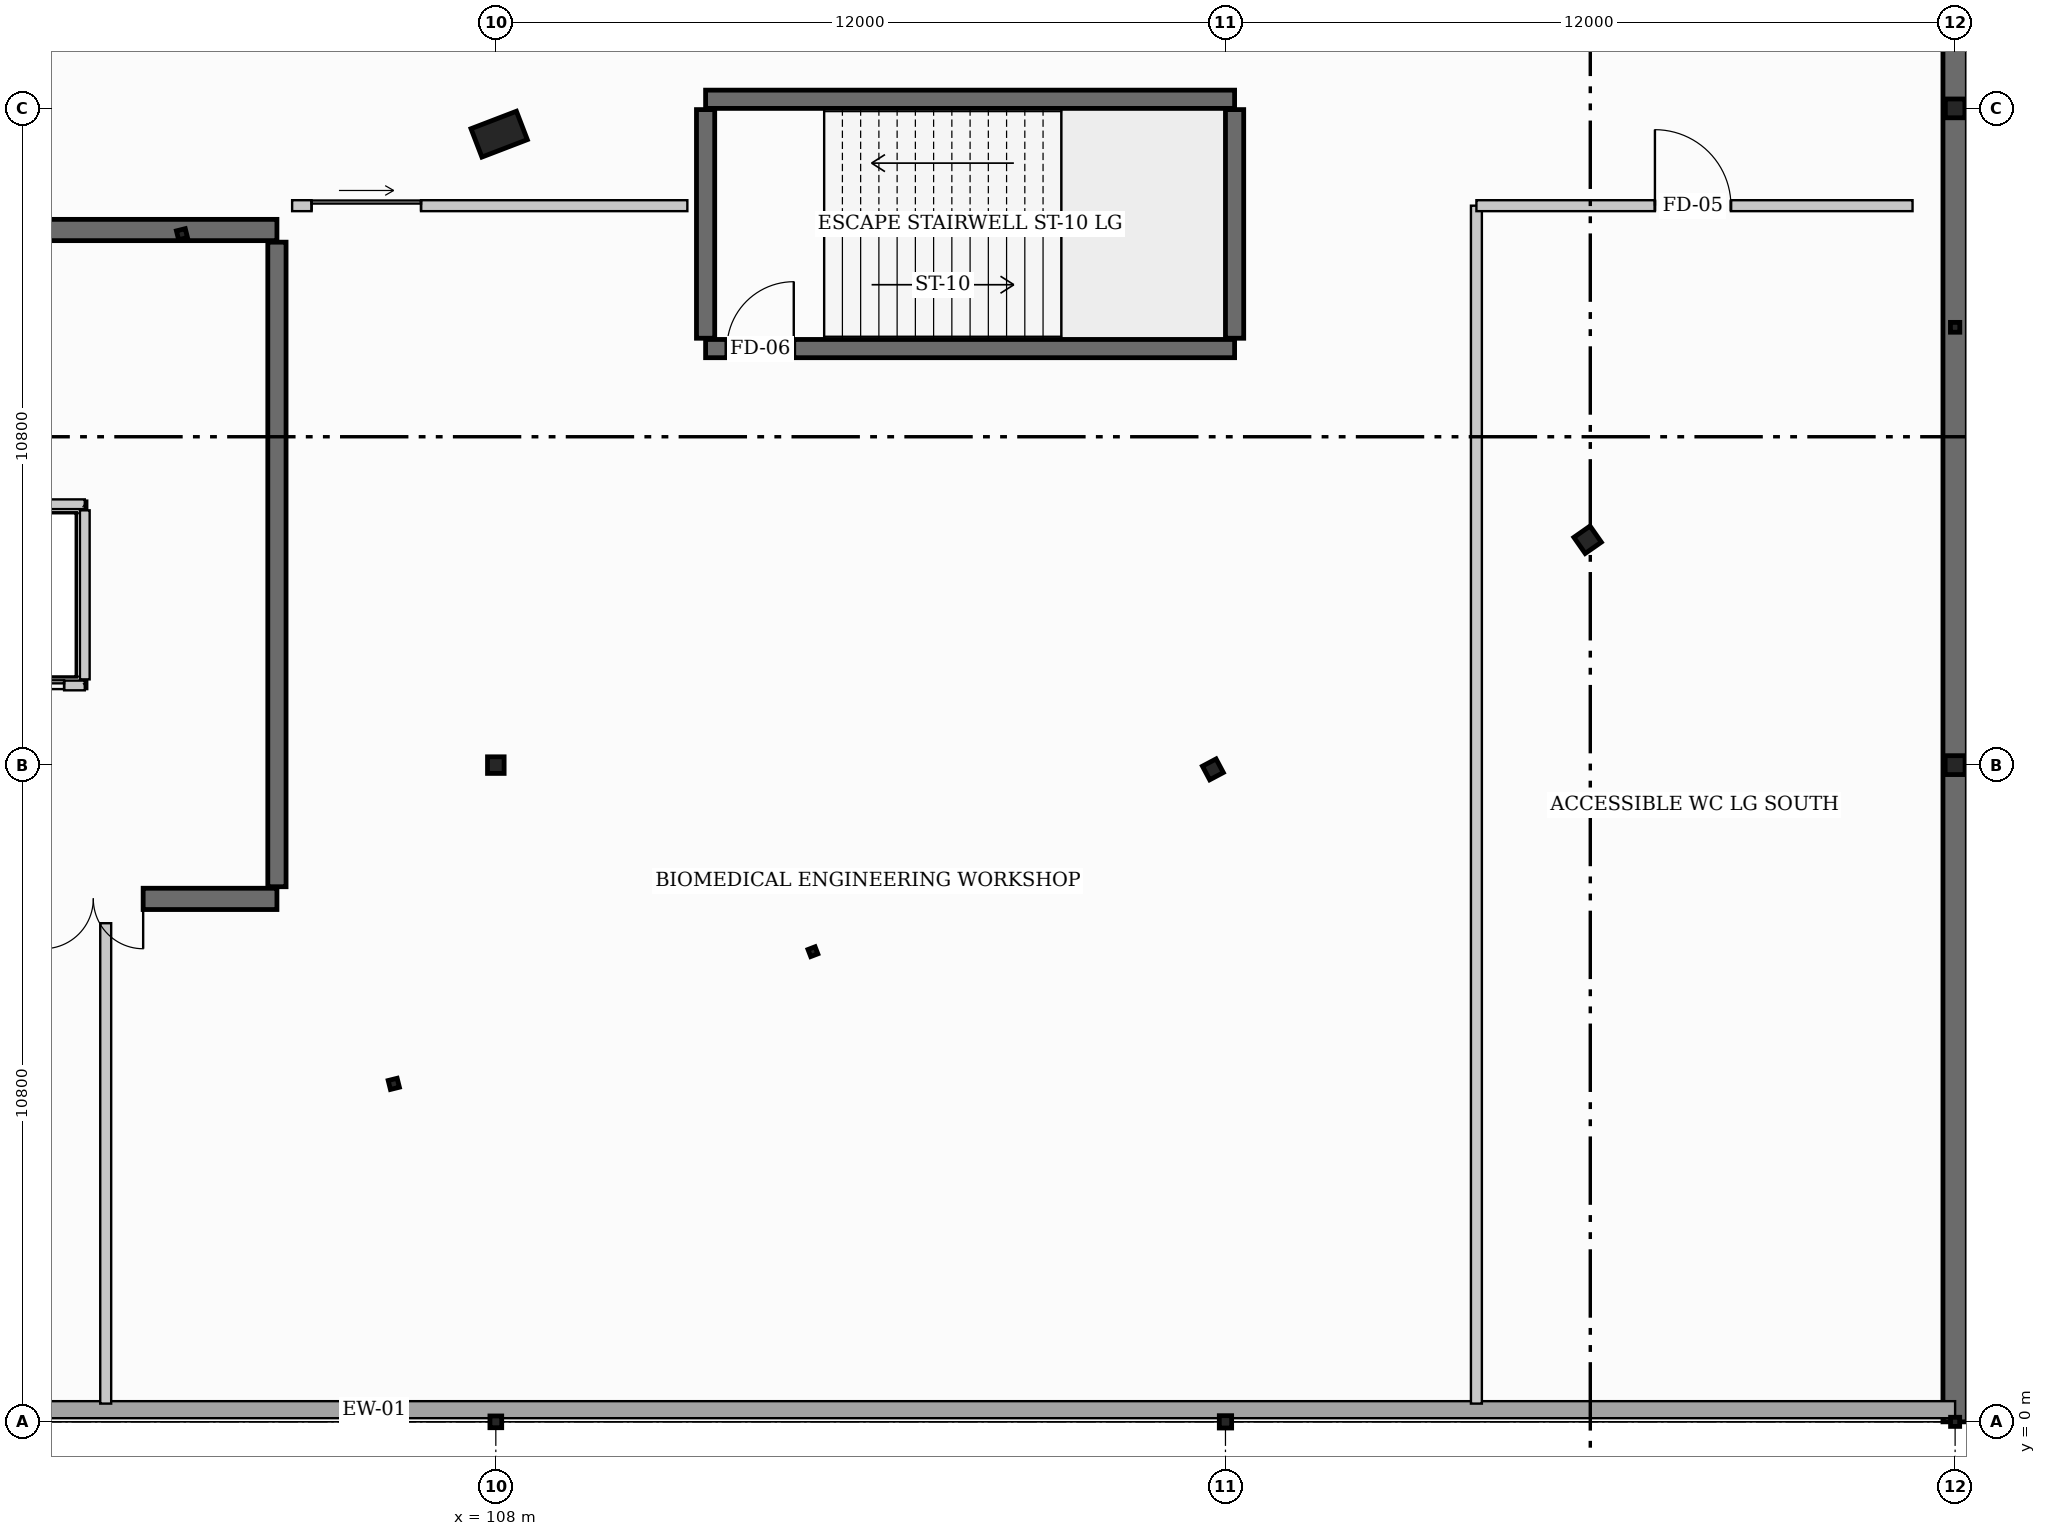
"""IFC4 building model, lengths in metres.
Left out: names, types, materials, properties, quantities, classifications, styles, units other than length and angle.
Written with IfcOpenShell. Run it as: python <this file> out.ifc"""

import sys

from ifc_helpers import new_model, si_unit, direction, frame, frame_2d, origin, origin_2d, place, context, subcontext, project, spatial, rectangle, hollow_rectangle, hollow_circle, i_section, extrude, element, fill, save


model = new_model("IFC4")
c1 = context("Model", 3, precision=1e-05, world=origin(), true_north=direction((0.0, 1.0)))
c2 = subcontext(c1, "Body", "Model", "MODEL_VIEW")
j1 = project(units=[si_unit("LENGTHUNIT", "METRE"), si_unit("PLANEANGLEUNIT", "RADIAN")], contexts=[c1])
p1 = place(None, origin())
s1 = spatial("IfcSite", under=j1, at=p1, CompositionType="ELEMENT")
p2 = place(p1, origin())
s2 = spatial("IfcBuilding", under=s1, at=p2, CompositionType="ELEMENT")
p3 = place(p2, frame((0.0, 0.0, -4.8)))
s3 = spatial("IfcBuildingStorey", under=s2, at=p3, CompositionType="ELEMENT", Elevation=-4.8)
p4 = place(p3, frame((132.0, 0.0, 0.0), z_axis=(0.0, 0.0, 1.0), x_axis=(0.0, 1.0, 0.0)))
e1 = element("IfcWall", 1, at=p4, inside=s3, PredefinedType="USERDEFINED", context=c2, shape_type="SweptSolid", body=[
    extrude(rectangle(XDim=45.6, YDim=0.4, at=frame_2d((22.8, 0.0))), origin(), (0.0, 0.0, 1.0), 4.8),
])
p5 = place(p3, frame((108.0, 0.0, 0.0), z_axis=(0.0, 0.0, 1.0), x_axis=(0.0, 1.0, 0.0)))
e2 = element("IfcColumn", 2, at=p5, inside=s3, PredefinedType="COLUMN", context=c2, shape_type="SweptSolid", body=[
    extrude(hollow_circle(Radius=0.097, WallThickness=0.008, at=origin_2d()), origin(), (0.0, 0.0, 1.0), 4.8),
])
p6 = place(p3, frame((108.0, 10.8, 0.0), z_axis=(0.0, 0.0, 1.0), x_axis=(0.0, 1.0, 0.0)))
e3 = element("IfcColumn", 3, at=p6, inside=s3, PredefinedType="COLUMN", context=c2, shape_type="SweptSolid", body=[
    extrude(hollow_circle(Radius=0.136, WallThickness=0.013, at=origin_2d()), origin(), (0.0, 0.0, 1.0), 4.8),
])
p7 = place(p3, frame((120.0, 0.0, 0.0), z_axis=(0.0, 0.0, 1.0), x_axis=(1.0, 0.0, 0.0)))
e4 = element("IfcColumn", 4, at=p7, inside=s3, PredefinedType="COLUMN", context=c2, shape_type="SweptSolid", body=[
    extrude(i_section(OverallWidth=0.203, OverallDepth=0.203, WebThickness=0.007, FlangeThickness=0.011, at=origin_2d()), origin(), (0.0, 0.0, 1.0), 4.8),
])
p8 = place(p3, frame((132.0, 0.0, 0.0), z_axis=(0.0, 0.0, 1.0), x_axis=(0.0, 1.0, 0.0)))
e5 = element("IfcColumn", 5, at=p8, inside=s3, PredefinedType="COLUMN", context=c2, shape_type="SweptSolid", body=[
    extrude(hollow_rectangle(XDim=0.15, YDim=0.15, WallThickness=0.008, at=origin_2d()), origin(), (0.0, 0.0, 1.0), 4.8),
])
p9 = place(p3, frame((132.0, 10.8, 0.0), z_axis=(0.0, 0.0, 1.0), x_axis=(0.0, 1.0, 0.0)))
e6 = element("IfcColumn", 6, at=p9, inside=s3, PredefinedType="COLUMN", context=c2, shape_type="SweptSolid", body=[
    extrude(i_section(OverallWidth=0.311, OverallDepth=0.327, WebThickness=0.016, FlangeThickness=0.025, at=origin_2d()), origin(), (0.0, 0.0, 1.0), 4.8),
])
p10 = place(p3, frame((132.0, 21.6, 0.0), z_axis=(0.0, 0.0, 1.0), x_axis=(0.0, 1.0, 0.0)))
e7 = element("IfcColumn", 7, at=p10, inside=s3, PredefinedType="COLUMN", context=c2, shape_type="SweptSolid", body=[
    extrude(i_section(OverallWidth=0.309, OverallDepth=0.321, WebThickness=0.014, FlangeThickness=0.022, at=origin_2d()), origin(), (0.0, 0.0, 1.0), 4.8),
])
p11 = place(p3, frame((106.322, 5.558, 0.0), z_axis=(0.0, 0.0, 1.0), x_axis=(-0.2419218956, 0.970295726276, 0.0)))
e8 = element("IfcColumn", 8, at=p11, inside=s3, PredefinedType="COLUMN", context=c2, shape_type="SweptSolid", body=[
    extrude(i_section(OverallWidth=0.152, OverallDepth=0.152, WebThickness=0.006, FlangeThickness=0.007, at=origin_2d()), origin(), (0.0, 0.0, 1.0), 4.8),
])
p12 = place(p3, frame((102.838, 19.531, 0.0), z_axis=(0.0, 0.0, 1.0), x_axis=(-0.2419218956, 0.970295726276, 0.0)))
e9 = element("IfcColumn", 9, at=p12, inside=s3, PredefinedType="COLUMN", context=c2, shape_type="SweptSolid", body=[
    extrude(hollow_rectangle(XDim=0.15, YDim=0.15, WallThickness=0.008, at=origin_2d()), origin(), (0.0, 0.0, 1.0), 4.8),
])
p13 = place(p3, frame((113.215, 7.732, 0.0), z_axis=(0.0, 0.0, 1.0), x_axis=(-0.358367949545, 0.933580426497, 0.0)))
e10 = element("IfcColumn", 10, at=p13, inside=s3, PredefinedType="COLUMN", context=c2, shape_type="SweptSolid", body=[
    extrude(hollow_rectangle(XDim=0.125, YDim=0.125, WallThickness=0.006, at=origin_2d()), origin(), (0.0, 0.0, 1.0), 4.8),
])
p14 = place(p3, frame((108.055, 21.176, 0.0), z_axis=(0.0, 0.0, 1.0), x_axis=(-0.358367949545, 0.933580426497, 0.0)))
e11 = element("IfcColumn", 11, at=p14, inside=s3, PredefinedType="PILASTER", context=c2, shape_type="SweptSolid", body=[
    extrude(rectangle(XDim=0.5, YDim=0.8, at=origin_2d()), origin(), (0.0, 0.0, 1.0), 4.8),
])
p15 = place(p3, frame((119.793, 10.73, 0.0), z_axis=(0.0, 0.0, 1.0), x_axis=(-0.469471562786, 0.882947592859, 0.0)))
e12 = element("IfcColumn", 12, at=p15, inside=s3, PredefinedType="COLUMN", context=c2, shape_type="SweptSolid", body=[
    extrude(i_section(OverallWidth=0.254, OverallDepth=0.254, WebThickness=0.009, FlangeThickness=0.014, at=origin_2d()), origin(), (0.0, 0.0, 1.0), 4.8),
])
p16 = place(p3, frame((125.956, 14.506, 0.0), z_axis=(0.0, 0.0, 1.0), x_axis=(-0.573576436351, 0.819152044289, 0.0)))
e13 = element("IfcColumn", 13, at=p16, inside=s3, PredefinedType="COLUMN", context=c2, shape_type="SweptSolid", body=[
    extrude(hollow_circle(Radius=0.162, WallThickness=0.013, at=origin_2d()), origin(), (0.0, 0.0, 1.0), 4.8),
])
p17 = place(p3, frame((132.0, 18.0, 0.0), z_axis=(0.0, 0.0, 1.0), x_axis=(1.0, 0.0, 0.0)))
e14 = element("IfcColumn", 14, at=p17, inside=s3, PredefinedType="COLUMN", context=c2, shape_type="SweptSolid", body=[
    extrude(i_section(OverallWidth=0.154, OverallDepth=0.162, WebThickness=0.008, FlangeThickness=0.011, at=origin_2d()), origin(), (0.0, 0.0, 1.0), 4.8),
])
p18 = place(p3, frame((84.0, 19.6, 0.0), z_axis=(0.0, 0.0, 1.0), x_axis=(1.0, 0.0, 0.0)))
e15 = element("IfcWall", 15, at=p18, inside=s3, PredefinedType="SHEAR", context=c2, shape_type="SweptSolid", body=[
    extrude(rectangle(XDim=20.4, YDim=0.35, at=frame_2d((10.2, 0.0))), origin(), (0.0, 0.0, 1.0), 4.8),
])
p19 = place(p3, frame((104.4, 8.6, 0.0), z_axis=(0.0, 0.0, 1.0), x_axis=(-1.0, 0.0, 0.0)))
e16 = element("IfcWall", 16, at=p19, inside=s3, PredefinedType="SHEAR", context=c2, shape_type="SweptSolid", body=[
    extrude(rectangle(XDim=20.4, YDim=0.35, at=frame_2d((10.2, 0.0))), origin(), (0.0, 0.0, 1.0), 4.8),
])
p20 = place(p19, frame((2.2, 0.0, 0.0)))
e17 = element("IfcOpeningElement", 17, at=p20, cuts=e16, PredefinedType="OPENING", context=c2, shape_type="SweptSolid", body=[
    extrude(rectangle(XDim=1.64, YDim=2.2, at=frame_2d((0.82, 1.1))), frame((0.0, 0.185, 0.0), z_axis=(0.0, -1.0, 0.0), x_axis=(1.0, 0.0, 0.0)), (0.0, 0.0, 1.0), 0.37),
])
p21 = place(p19, frame((13.0, 0.0, 0.0)))
e18 = element("IfcOpeningElement", 18, at=p21, cuts=e16, PredefinedType="OPENING", context=c2, shape_type="SweptSolid", body=[
    extrude(rectangle(XDim=1.52, YDim=2.16, at=frame_2d((0.76, 1.08))), frame((0.0, 0.185, 0.0), z_axis=(0.0, -1.0, 0.0), x_axis=(1.0, 0.0, 0.0)), (0.0, 0.0, 1.0), 0.37),
])
p22 = place(p3, frame((104.4, 19.4, 0.0), z_axis=(0.0, 0.0, 1.0), x_axis=(0.0, -1.0, 0.0)))
e19 = element("IfcWall", 19, at=p22, inside=s3, PredefinedType="SHEAR", context=c2, shape_type="SweptSolid", body=[
    extrude(rectangle(XDim=10.6, YDim=0.3, at=frame_2d((5.3, 0.0))), origin(), (0.0, 0.0, 1.0), 4.8),
])
p23 = place(p3, frame((111.45, 17.65, 0.0), z_axis=(0.0, 0.0, 1.0), x_axis=(1.0, 0.0, 0.0)))
e20 = element("IfcWall", 20, at=p23, inside=s3, PredefinedType="SHEAR", context=c2, shape_type="SweptSolid", body=[
    extrude(rectangle(XDim=8.7, YDim=0.3, at=frame_2d((4.35, 0.0))), origin(), (0.0, 0.0, 1.0), 4.8),
])
p24 = place(p23, frame((0.35, 0.0, 0.0)))
e21 = element("IfcOpeningElement", 21, at=p24, cuts=e20, PredefinedType="OPENING", context=c2, shape_type="SweptSolid", body=[
    extrude(rectangle(XDim=1.1, YDim=2.15, at=frame_2d((0.55, 1.075))), frame((0.0, 0.16, 0.0), z_axis=(0.0, -1.0, 0.0), x_axis=(1.0, 0.0, 0.0)), (0.0, 0.0, 1.0), 0.32),
])
p25 = place(p3, frame((120.15, 21.75, 0.0), z_axis=(0.0, 0.0, 1.0), x_axis=(-1.0, 0.0, 0.0)))
e22 = element("IfcWall", 22, at=p25, inside=s3, PredefinedType="SHEAR", context=c2, shape_type="SweptSolid", body=[
    extrude(rectangle(XDim=8.7, YDim=0.3, at=frame_2d((4.35, 0.0))), origin(), (0.0, 0.0, 1.0), 4.8),
])
for number, where, z_axis, x_axis in (
    (23, (111.45, 17.82, 0.0), (0.0, 0.0, 1.0), (0.0, 1.0, 0.0)),
    (24, (120.15, 17.82, 0.0), (0.0, 0.0, 1.0), (0.0, 1.0, 0.0)),
):
    element("IfcWall", number, at=place(p3, frame(where, z_axis=z_axis, x_axis=x_axis)), inside=s3, PredefinedType="SHEAR", context=c2, shape_type="SweptSolid", body=[
        extrude(rectangle(XDim=3.76, YDim=0.3, at=frame_2d((1.88, 0.0))), origin(), (0.0, 0.0, 1.0), 4.8),
    ])
p26 = place(p3, frame((132.0, 0.2, 0.0), z_axis=(0.0, 0.0, 1.0), x_axis=(-1.0, 0.0, 0.0)))
e25 = element("IfcWall", 25, at=p26, inside=s3, PredefinedType="STANDARD", context=c2, shape_type="SweptSolid", body=[
    extrude(rectangle(XDim=52.0, YDim=0.28, at=frame_2d((26.0, 0.0))), origin(), (0.0, 0.0, 1.0), 3.465),
])
p27 = place(p3, frame((99.16, 12.11, 0.0), z_axis=(0.0, 0.0, 1.0), x_axis=(1.0, 0.0, 0.0)))
e26 = element("IfcWall", 26, at=p27, inside=s3, PredefinedType="PARTITIONING", context=c2, shape_type="SweptSolid", body=[
    extrude(rectangle(XDim=2.08, YDim=0.16, at=frame_2d((1.04, 0.0))), origin(), (0.0, 0.0, 1.0), 4.43),
])
p28 = place(p27, frame((0.34, 0.0, 0.0)))
e27 = element("IfcOpeningElement", 27, at=p28, cuts=e26, PredefinedType="OPENING", context=c2, shape_type="SweptSolid", body=[
    extrude(rectangle(XDim=1.4, YDim=2.2, at=frame_2d((0.7, 1.1))), frame((0.0, 0.09, 0.0), z_axis=(0.0, -1.0, 0.0), x_axis=(1.0, 0.0, 0.0)), (0.0, 0.0, 1.0), 0.18),
])
p29 = place(p3, frame((101.24, 15.09, 0.0), z_axis=(0.0, 0.0, 1.0), x_axis=(-1.0, 0.0, 0.0)))
e28 = element("IfcWall", 28, at=p29, inside=s3, PredefinedType="PARTITIONING", context=c2, shape_type="SweptSolid", body=[
    extrude(rectangle(XDim=2.08, YDim=0.16, at=frame_2d((1.04, 0.0))), origin(), (0.0, 0.0, 1.0), 4.43),
])
p30 = place(p3, frame((101.24, 12.21, 0.0), z_axis=(0.0, 0.0, 1.0), x_axis=(0.0, 1.0, 0.0)))
e29 = element("IfcWall", 29, at=p30, inside=s3, PredefinedType="PARTITIONING", context=c2, shape_type="SweptSolid", body=[
    extrude(rectangle(XDim=2.78, YDim=0.16, at=frame_2d((1.39, 0.0))), origin(), (0.0, 0.0, 1.0), 4.43),
])
p31 = place(p3, frame((101.584, 0.3, 0.0), z_axis=(0.0, 0.0, 1.0), x_axis=(0.0, 1.0, 0.0)))
e30 = element("IfcWall", 30, at=p31, inside=s3, PredefinedType="PARTITIONING", context=c2, shape_type="SweptSolid", body=[
    extrude(rectangle(XDim=7.9, YDim=0.18, at=frame_2d((3.95, 0.0))), origin(), (0.0, 0.0, 1.0), 3.961),
])
p32 = place(p3, frame((104.65, 20.0, 0.0), z_axis=(0.0, 0.0, 1.0), x_axis=(1.0, 0.0, 0.0)))
e31 = element("IfcWall", 31, at=p32, inside=s3, PredefinedType="PARTITIONING", context=c2, shape_type="SweptSolid", body=[
    extrude(rectangle(XDim=6.5, YDim=0.18, at=frame_2d((3.25, 0.0))), origin(), (0.0, 0.0, 1.0), 4.43),
])
p33 = place(p32, frame((0.32, 0.0, 0.0)))
e32 = element("IfcOpeningElement", 32, at=p33, cuts=e31, PredefinedType="OPENING", context=c2, shape_type="SweptSolid", body=[
    extrude(rectangle(XDim=1.8, YDim=2.32, at=frame_2d((0.9, 1.16))), frame((0.0, 0.1, 0.0), z_axis=(0.0, -1.0, 0.0), x_axis=(1.0, 0.0, 0.0)), (0.0, 0.0, 1.0), 0.2),
])
p34 = place(p3, frame((124.127, 0.3, 0.0), z_axis=(0.0, 0.0, 1.0), x_axis=(0.0, 1.0, 0.0)))
e33 = element("IfcWall", 33, at=p34, inside=s3, PredefinedType="PARTITIONING", context=c2, shape_type="SweptSolid", body=[
    extrude(rectangle(XDim=19.7, YDim=0.18, at=frame_2d((9.85, 0.0))), origin(), (0.0, 0.0, 1.0), 4.115),
])
p35 = place(p3, frame((124.127, 20.0, 0.0), z_axis=(0.0, 0.0, 1.0), x_axis=(1.0, 0.0, 0.0)))
e34 = element("IfcWall", 34, at=p35, inside=s3, PredefinedType="PARTITIONING", context=c2, shape_type="SweptSolid", body=[
    extrude(rectangle(XDim=7.173, YDim=0.18, at=frame_2d((3.586, 0.0))), origin(), (0.0, 0.0, 1.0), 4.43),
])
p36 = place(p35, frame((2.936, 0.0, 0.0)))
e35 = element("IfcOpeningElement", 35, at=p36, cuts=e34, PredefinedType="OPENING", context=c2, shape_type="SweptSolid", body=[
    extrude(rectangle(XDim=1.25, YDim=2.15, at=frame_2d((0.625, 1.075))), frame((0.0, 0.1, 0.0), z_axis=(0.0, -1.0, 0.0), x_axis=(1.0, 0.0, 0.0)), (0.0, 0.0, 1.0), 0.2),
])
p37 = place(p28, origin())
e36 = element("IfcDoor", 36, at=p37, inside=s3, OperationType="SLIDING_TO_LEFT", PredefinedType="DOOR", context=c2, shape_type="SweptSolid", body=[
    extrude(rectangle(XDim=1.4, YDim=2.2, at=frame_2d((0.7, 1.1))), frame((0.0, 0.025, 0.0), z_axis=(0.0, -1.0, 0.0), x_axis=(1.0, 0.0, 0.0)), (0.0, 0.0, 1.0), 0.05),
])
fill(e27, e36)
p38 = place(p24, origin())
e37 = element("IfcDoor", 37, at=p38, inside=s3, OperationType="SINGLE_SWING_RIGHT", PredefinedType="DOOR", context=c2, shape_type="SweptSolid", body=[
    extrude(rectangle(XDim=1.1, YDim=2.15, at=frame_2d((0.55, 1.075))), frame((0.0, 0.025, 0.0), z_axis=(0.0, -1.0, 0.0), x_axis=(1.0, 0.0, 0.0)), (0.0, 0.0, 1.0), 0.05),
])
fill(e21, e37)
p39 = place(p20, origin())
e38 = element("IfcDoor", 38, at=p39, inside=s3, OperationType="DOUBLE_DOOR_SINGLE_SWING", PredefinedType="DOOR", context=c2, shape_type="SweptSolid", body=[
    extrude(rectangle(XDim=1.64, YDim=2.2, at=frame_2d((0.82, 1.1))), frame((0.0, 0.025, 0.0), z_axis=(0.0, -1.0, 0.0), x_axis=(1.0, 0.0, 0.0)), (0.0, 0.0, 1.0), 0.05),
])
fill(e17, e38)
p40 = place(p33, origin())
e39 = element("IfcDoor", 39, at=p40, inside=s3, OperationType="SLIDING_TO_LEFT", PredefinedType="DOOR", context=c2, shape_type="SweptSolid", body=[
    extrude(rectangle(XDim=1.8, YDim=2.32, at=frame_2d((0.9, 1.16))), frame((0.0, 0.025, 0.0), z_axis=(0.0, -1.0, 0.0), x_axis=(1.0, 0.0, 0.0)), (0.0, 0.0, 1.0), 0.05),
])
fill(e32, e39)
p41 = place(p36, origin())
e40 = element("IfcDoor", 40, at=p41, inside=s3, OperationType="SINGLE_SWING_LEFT", PredefinedType="DOOR", context=c2, shape_type="SweptSolid", body=[
    extrude(rectangle(XDim=1.25, YDim=2.15, at=frame_2d((0.625, 1.075))), frame((0.0, 0.025, 0.0), z_axis=(0.0, -1.0, 0.0), x_axis=(1.0, 0.0, 0.0)), (0.0, 0.0, 1.0), 0.05),
])
fill(e35, e40)
save(model, sys.argv[1])
